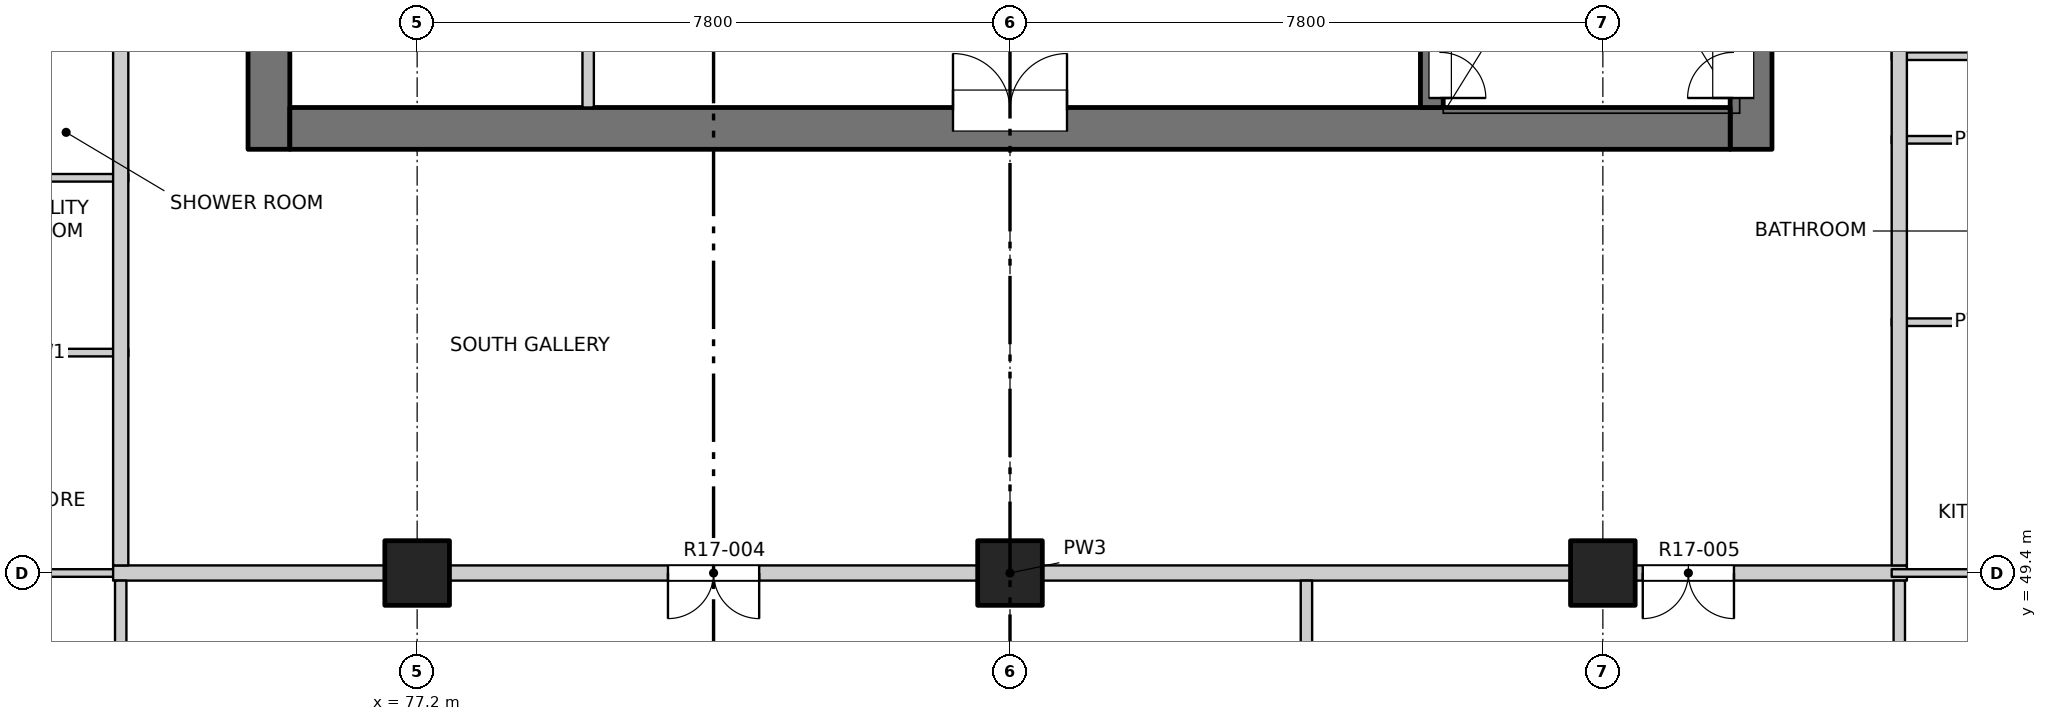
"""IFC4 building model, lengths in metres.
Left out: names, types, materials, properties, quantities, classifications, styles, units other than length and angle.
Written with IfcOpenShell. Run it as: python <this file> out.ifc"""

import sys

from ifc_helpers import new_model, si_unit, direction, frame, frame_2d, origin, origin_2d, place, context, subcontext, project, spatial, rectangle, extrude, element, fill, save


model = new_model("IFC4")
c1 = context("Model", 3, precision=1e-05, world=origin(), true_north=direction((0.0, 1.0)))
c2 = subcontext(c1, "Body", "Model", "MODEL_VIEW")
j1 = project(units=[si_unit("LENGTHUNIT", "METRE"), si_unit("PLANEANGLEUNIT", "RADIAN")], contexts=[c1])
p1 = place(None, origin())
s1 = spatial("IfcSite", under=j1, at=p1, CompositionType="ELEMENT")
p2 = place(p1, origin())
s2 = spatial("IfcBuilding", under=s1, at=p2, CompositionType="ELEMENT")
p3 = place(p2, frame((0.0, 0.0, 179.2)))
s3 = spatial("IfcBuildingStorey", under=s2, at=p3, CompositionType="ELEMENT", Elevation=179.2)
for number, where, z_axis, x_axis in (
    (1, (77.2, 49.4, -0.3), (0.0, 0.0, 1.0), (1.0, 0.0, 0.0)),
    (2, (85.0, 49.4, -0.3), (0.0, 0.0, 1.0), (1.0, 0.0, 0.0)),
    (3, (92.8, 49.4, -0.3), (0.0, 0.0, 1.0), (1.0, 0.0, 0.0)),
):
    element("IfcColumn", number, at=place(p3, frame(where, z_axis=z_axis, x_axis=x_axis)), inside=s3, PredefinedType="COLUMN", context=c2, shape_type="SweptSolid", body=[
        extrude(rectangle(XDim=0.85, YDim=0.85, at=origin_2d()), origin(), (0.0, 0.0, 1.0), 3.45),
    ])
p4 = place(p3, frame((75.25, 54.975, -0.3), z_axis=(0.0, 0.0, 1.0), x_axis=(0.0, 1.0, 0.0)))
e4 = element("IfcWall", 4, at=p4, inside=s3, PredefinedType="SOLIDWALL", context=c2, shape_type="SweptSolid", body=[
    extrude(rectangle(XDim=22.325, YDim=0.55, at=frame_2d((11.163, 0.0))), origin(), (0.0, 0.0, 1.0), 3.45),
])
p5 = place(p4, frame((7.475, 0.0, 0.3)))
e5 = element("IfcOpeningElement", 5, at=p5, cuts=e4, PredefinedType="OPENING", context=c2, shape_type="SweptSolid", body=[
    extrude(rectangle(XDim=0.9, YDim=2.1, at=frame_2d((0.45, 1.05))), frame((0.0, 0.285, 0.0), z_axis=(0.0, -1.0, 0.0), x_axis=(1.0, 0.0, 0.0)), (0.0, 0.0, 1.0), 0.57),
])
p6 = place(p4, frame((10.775, 0.0, 0.3)))
e6 = element("IfcOpeningElement", 6, at=p6, cuts=e4, PredefinedType="OPENING", context=c2, shape_type="SweptSolid", body=[
    extrude(rectangle(XDim=0.9, YDim=2.1, at=frame_2d((0.45, 1.05))), frame((0.0, 0.285, 0.0), z_axis=(0.0, -1.0, 0.0), x_axis=(1.0, 0.0, 0.0)), (0.0, 0.0, 1.0), 0.57),
])
p7 = place(p4, frame((15.275, 0.0, 0.3)))
e7 = element("IfcOpeningElement", 7, at=p7, cuts=e4, PredefinedType="OPENING", context=c2, shape_type="SweptSolid", body=[
    extrude(rectangle(XDim=0.9, YDim=2.1, at=frame_2d((0.45, 1.05))), frame((0.0, 0.285, 0.0), z_axis=(0.0, -1.0, 0.0), x_axis=(1.0, 0.0, 0.0)), (0.0, 0.0, 1.0), 0.57),
])
p8 = place(p4, frame((20.075, 0.0, 0.3)))
e8 = element("IfcOpeningElement", 8, at=p8, cuts=e4, PredefinedType="OPENING", context=c2, shape_type="SweptSolid", body=[
    extrude(rectangle(XDim=0.9, YDim=2.1, at=frame_2d((0.45, 1.05))), frame((0.0, 0.285, 0.0), z_axis=(0.0, -1.0, 0.0), x_axis=(1.0, 0.0, 0.0)), (0.0, 0.0, 1.0), 0.57),
])
p9 = place(p3, frame((94.75, 54.975, -0.3), z_axis=(0.0, 0.0, 1.0), x_axis=(0.0, 1.0, 0.0)))
e9 = element("IfcWall", 9, at=p9, inside=s3, PredefinedType="SOLIDWALL", context=c2, shape_type="SweptSolid", body=[
    extrude(rectangle(XDim=6.975, YDim=0.55, at=frame_2d((3.487, 0.0))), origin(), (0.0, 0.0, 1.0), 3.45),
])
p10 = place(p9, frame((0.675, 0.0, 0.3)))
e10 = element("IfcOpeningElement", 10, at=p10, cuts=e9, PredefinedType="OPENING", context=c2, shape_type="SweptSolid", body=[
    extrude(rectangle(XDim=1.2, YDim=2.1, at=frame_2d((0.6, 1.05))), frame((0.0, 0.285, 0.0), z_axis=(0.0, -1.0, 0.0), x_axis=(1.0, 0.0, 0.0)), (0.0, 0.0, 1.0), 0.57),
])
p11 = place(p3, frame((75.525, 55.25, -0.3), z_axis=(0.0, 0.0, 1.0), x_axis=(1.0, 0.0, 0.0)))
e11 = element("IfcWall", 11, at=p11, inside=s3, PredefinedType="SOLIDWALL", context=c2, shape_type="SweptSolid", body=[
    extrude(rectangle(XDim=18.95, YDim=0.55, at=frame_2d((9.475, 0.0))), origin(), (0.0, 0.0, 1.0), 3.45),
])
p12 = place(p11, frame((8.725, 0.0, 0.3)))
e12 = element("IfcOpeningElement", 12, at=p12, cuts=e11, PredefinedType="OPENING", context=c2, shape_type="SweptSolid", body=[
    extrude(rectangle(XDim=1.5, YDim=2.1, at=frame_2d((0.75, 1.05))), frame((0.0, 0.285, 0.0), z_axis=(0.0, -1.0, 0.0), x_axis=(1.0, 0.0, 0.0)), (0.0, 0.0, 1.0), 0.57),
])
p13 = place(p3, frame((90.55, 55.525, -0.3), z_axis=(0.0, 0.0, 1.0), x_axis=(0.0, 1.0, 0.0)))
e13 = element("IfcWall", 13, at=p13, inside=s3, PredefinedType="SOLIDWALL", context=c2, shape_type="SweptSolid", body=[
    extrude(rectangle(XDim=6.425, YDim=0.3, at=frame_2d((3.212, 0.0))), origin(), (0.0, 0.0, 1.0), 3.45),
])
p14 = place(p13, frame((0.125, 0.0, 0.3)))
e14 = element("IfcOpeningElement", 14, at=p14, cuts=e13, PredefinedType="OPENING", context=c2, shape_type="SweptSolid", body=[
    extrude(rectangle(XDim=1.2, YDim=2.1, at=frame_2d((0.6, 1.05))), frame((0.0, 0.16, 0.0), z_axis=(0.0, -1.0, 0.0), x_axis=(1.0, 0.0, 0.0)), (0.0, 0.0, 1.0), 0.32),
])
p15 = place(p3, frame((65.8, 49.4, 0.0), z_axis=(0.0, 0.0, 1.0), x_axis=(1.0, 0.0, 0.0)))
e15 = element("IfcWall", 15, at=p15, inside=s3, PredefinedType="PARTITIONING", context=c2, shape_type="SweptSolid", body=[
    extrude(rectangle(XDim=7.6, YDim=0.1, at=frame_2d((3.8, 0.0))), origin(), (0.0, 0.0, 1.0), 3.15),
])
p16 = place(p15, frame((4.14, 0.0, 0.0)))
e16 = element("IfcOpeningElement", 16, at=p16, cuts=e15, PredefinedType="OPENING", context=c2, shape_type="SweptSolid", body=[
    extrude(rectangle(XDim=0.9, YDim=2.1, at=frame_2d((0.45, 1.05))), frame((0.0, 0.06, 0.0), z_axis=(0.0, -1.0, 0.0), x_axis=(1.0, 0.0, 0.0)), (0.0, 0.0, 1.0), 0.12),
])
p17 = place(p3, frame((73.2, 49.4, 0.0), z_axis=(0.0, 0.0, 1.0), x_axis=(1.0, 0.0, 0.0)))
e17 = element("IfcWall", 17, at=p17, inside=s3, PredefinedType="PARTITIONING", context=c2, shape_type="SweptSolid", body=[
    extrude(rectangle(XDim=23.6, YDim=0.2, at=frame_2d((11.8, 0.0))), origin(), (0.0, 0.0, 1.0), 3.15),
])
p18 = place(p17, frame((7.3, 0.0, 0.0)))
e18 = element("IfcOpeningElement", 18, at=p18, cuts=e17, PredefinedType="OPENING", context=c2, shape_type="SweptSolid", body=[
    extrude(rectangle(XDim=1.2, YDim=2.1, at=frame_2d((0.6, 1.05))), frame((0.0, 0.11, 0.0), z_axis=(0.0, -1.0, 0.0), x_axis=(1.0, 0.0, 0.0)), (0.0, 0.0, 1.0), 0.22),
])
p19 = place(p17, frame((20.125, 0.0, 0.0)))
e19 = element("IfcOpeningElement", 19, at=p19, cuts=e17, PredefinedType="OPENING", context=c2, shape_type="SweptSolid", body=[
    extrude(rectangle(XDim=1.2, YDim=2.1, at=frame_2d((0.6, 1.05))), frame((0.0, 0.11, 0.0), z_axis=(0.0, -1.0, 0.0), x_axis=(1.0, 0.0, 0.0)), (0.0, 0.0, 1.0), 0.22),
])
p20 = place(p3, frame((96.6, 49.4, 0.0), z_axis=(0.0, 0.0, 1.0), x_axis=(1.0, 0.0, 0.0)))
e20 = element("IfcWall", 20, at=p20, inside=s3, PredefinedType="PARTITIONING", context=c2, shape_type="SweptSolid", body=[
    extrude(rectangle(XDim=7.6, YDim=0.1, at=frame_2d((3.8, 0.0))), origin(), (0.0, 0.0, 1.0), 3.15),
])
p21 = place(p20, frame((2.56, 0.0, 0.0)))
e21 = element("IfcOpeningElement", 21, at=p21, cuts=e20, PredefinedType="OPENING", context=c2, shape_type="SweptSolid", body=[
    extrude(rectangle(XDim=0.9, YDim=2.1, at=frame_2d((0.45, 1.05))), frame((0.0, 0.06, 0.0), z_axis=(0.0, -1.0, 0.0), x_axis=(1.0, 0.0, 0.0)), (0.0, 0.0, 1.0), 0.12),
])
for number, where, z_axis, x_axis in (
    (22, (71.18, 52.3, 0.0), (0.0, 0.0, 1.0), (1.0, 0.0, 0.0)),
    (23, (96.6, 52.7, 0.0), (0.0, 0.0, 1.0), (1.0, 0.0, 0.0)),
    (24, (71.18, 54.6, 0.0), (0.0, 0.0, 1.0), (1.0, 0.0, 0.0)),
    (25, (96.6, 55.1, 0.0), (0.0, 0.0, 1.0), (1.0, 0.0, 0.0)),
    (26, (96.6, 56.2, 0.0), (0.0, 0.0, 1.0), (1.0, 0.0, 0.0)),
):
    element("IfcWall", number, at=place(p3, frame(where, z_axis=z_axis, x_axis=x_axis)), inside=s3, PredefinedType="PARTITIONING", context=c2, shape_type="SweptSolid", body=[
        extrude(rectangle(XDim=2.22, YDim=0.1, at=frame_2d((1.11, 0.0))), origin(), (0.0, 0.0, 1.0), 3.15),
    ])
p22 = place(p3, frame((73.3, 45.8, 0.0), z_axis=(0.0, 0.0, 1.0), x_axis=(0.0, 1.0, 0.0)))
e27 = element("IfcWall", 27, at=p22, inside=s3, PredefinedType="PARTITIONING", context=c2, shape_type="SweptSolid", body=[
    extrude(rectangle(XDim=3.5, YDim=0.15, at=frame_2d((1.75, 0.0))), origin(), (0.0, 0.0, 1.0), 3.15),
])
p23 = place(p3, frame((73.3, 49.5, 0.0), z_axis=(0.0, 0.0, 1.0), x_axis=(0.0, 1.0, 0.0)))
e28 = element("IfcWall", 28, at=p23, inside=s3, PredefinedType="PARTITIONING", context=c2, shape_type="SweptSolid", body=[
    extrude(rectangle(XDim=34.7, YDim=0.2, at=frame_2d((17.35, 0.0))), origin(), (0.0, 0.0, 1.0), 3.15),
])
p24 = place(p23, frame((10.575, 0.0, 0.0)))
e29 = element("IfcOpeningElement", 29, at=p24, cuts=e28, PredefinedType="OPENING", context=c2, shape_type="SweptSolid", body=[
    extrude(rectangle(XDim=1.0, YDim=2.1, at=frame_2d((0.5, 1.05))), frame((0.0, 0.11, 0.0), z_axis=(0.0, -1.0, 0.0), x_axis=(1.0, 0.0, 0.0)), (0.0, 0.0, 1.0), 0.22),
])
p25 = place(p23, frame((18.825, 0.0, 0.0)))
e30 = element("IfcOpeningElement", 30, at=p25, cuts=e28, PredefinedType="OPENING", context=c2, shape_type="SweptSolid", body=[
    extrude(rectangle(XDim=1.0, YDim=2.1, at=frame_2d((0.5, 1.05))), frame((0.0, 0.11, 0.0), z_axis=(0.0, -1.0, 0.0), x_axis=(1.0, 0.0, 0.0)), (0.0, 0.0, 1.0), 0.22),
])
p26 = place(p23, frame((29.075, 0.0, 0.0)))
e31 = element("IfcOpeningElement", 31, at=p26, cuts=e28, PredefinedType="OPENING", context=c2, shape_type="SweptSolid", body=[
    extrude(rectangle(XDim=1.0, YDim=2.1, at=frame_2d((0.5, 1.05))), frame((0.0, 0.11, 0.0), z_axis=(0.0, -1.0, 0.0), x_axis=(1.0, 0.0, 0.0)), (0.0, 0.0, 1.0), 0.22),
])
p27 = place(p3, frame((79.45, 55.525, 0.0), z_axis=(0.0, 0.0, 1.0), x_axis=(0.0, 1.0, 0.0)))
e32 = element("IfcWall", 32, at=p27, inside=s3, PredefinedType="PARTITIONING", context=c2, shape_type="SweptSolid", body=[
    extrude(rectangle(XDim=5.375, YDim=0.15, at=frame_2d((2.688, 0.0))), origin(), (0.0, 0.0, 1.0), 3.15),
])
p28 = place(p27, frame((2.175, 0.0, 0.0)))
e33 = element("IfcOpeningElement", 33, at=p28, cuts=e32, PredefinedType="OPENING", context=c2, shape_type="SweptSolid", body=[
    extrude(rectangle(XDim=0.9, YDim=2.1, at=frame_2d((0.45, 1.05))), frame((0.0, 0.085, 0.0), z_axis=(0.0, -1.0, 0.0), x_axis=(1.0, 0.0, 0.0)), (0.0, 0.0, 1.0), 0.17),
])
p29 = place(p3, frame((88.9, 45.8, 0.0), z_axis=(0.0, 0.0, 1.0), x_axis=(0.0, 1.0, 0.0)))
e34 = element("IfcWall", 34, at=p29, inside=s3, PredefinedType="PARTITIONING", context=c2, shape_type="SweptSolid", body=[
    extrude(rectangle(XDim=3.5, YDim=0.15, at=frame_2d((1.75, 0.0))), origin(), (0.0, 0.0, 1.0), 2.55),
])
p30 = place(p3, frame((96.7, 45.8, 0.0), z_axis=(0.0, 0.0, 1.0), x_axis=(0.0, 1.0, 0.0)))
e35 = element("IfcWall", 35, at=p30, inside=s3, PredefinedType="PARTITIONING", context=c2, shape_type="SweptSolid", body=[
    extrude(rectangle(XDim=3.5, YDim=0.15, at=frame_2d((1.75, 0.0))), origin(), (0.0, 0.0, 1.0), 3.15),
])
p31 = place(p3, frame((96.7, 49.5, 0.0), z_axis=(0.0, 0.0, 1.0), x_axis=(0.0, 1.0, 0.0)))
e36 = element("IfcWall", 36, at=p31, inside=s3, PredefinedType="PARTITIONING", context=c2, shape_type="SweptSolid", body=[
    extrude(rectangle(XDim=34.7, YDim=0.2, at=frame_2d((17.35, 0.0))), origin(), (0.0, 0.0, 1.0), 3.15),
])
p32 = place(p31, frame((6.875, 0.0, 0.0)))
e37 = element("IfcOpeningElement", 37, at=p32, cuts=e36, PredefinedType="OPENING", context=c2, shape_type="SweptSolid", body=[
    extrude(rectangle(XDim=1.0, YDim=2.1, at=frame_2d((0.5, 1.05))), frame((0.0, 0.11, 0.0), z_axis=(0.0, -1.0, 0.0), x_axis=(1.0, 0.0, 0.0)), (0.0, 0.0, 1.0), 0.22),
])
p33 = place(p31, frame((21.775, 0.0, 0.0)))
e38 = element("IfcOpeningElement", 38, at=p33, cuts=e36, PredefinedType="OPENING", context=c2, shape_type="SweptSolid", body=[
    extrude(rectangle(XDim=1.0, YDim=2.1, at=frame_2d((0.5, 1.05))), frame((0.0, 0.11, 0.0), z_axis=(0.0, -1.0, 0.0), x_axis=(1.0, 0.0, 0.0)), (0.0, 0.0, 1.0), 0.22),
])
p34 = place(p31, frame((27.725, 0.0, 0.0)))
e39 = element("IfcOpeningElement", 39, at=p34, cuts=e36, PredefinedType="OPENING", context=c2, shape_type="SweptSolid", body=[
    extrude(rectangle(XDim=1.0, YDim=2.1, at=frame_2d((0.5, 1.05))), frame((0.0, 0.11, 0.0), z_axis=(0.0, -1.0, 0.0), x_axis=(1.0, 0.0, 0.0)), (0.0, 0.0, 1.0), 0.22),
])
p35 = place(p18, origin())
e40 = element("IfcDoor", 40, at=p35, inside=s3, OperationType="DOUBLE_DOOR_SINGLE_SWING", PredefinedType="DOOR", context=c2, shape_type="SweptSolid", body=[
    extrude(rectangle(XDim=1.2, YDim=2.1, at=frame_2d((0.6, 1.05))), frame((0.0, 0.025, 0.0), z_axis=(0.0, -1.0, 0.0), x_axis=(1.0, 0.0, 0.0)), (0.0, 0.0, 1.0), 0.05),
])
fill(e18, e40)
p36 = place(p19, origin())
e41 = element("IfcDoor", 41, at=p36, inside=s3, OperationType="DOUBLE_DOOR_SINGLE_SWING", PredefinedType="DOOR", context=c2, shape_type="SweptSolid", body=[
    extrude(rectangle(XDim=1.2, YDim=2.1, at=frame_2d((0.6, 1.05))), frame((0.0, 0.025, 0.0), z_axis=(0.0, -1.0, 0.0), x_axis=(1.0, 0.0, 0.0)), (0.0, 0.0, 1.0), 0.05),
])
fill(e19, e41)
p37 = place(p12, origin())
e42 = element("IfcDoor", 42, at=p37, inside=s3, OperationType="DOUBLE_DOOR_SINGLE_SWING", PredefinedType="DOOR", context=c2, shape_type="SweptSolid", body=[
    extrude(rectangle(XDim=1.5, YDim=2.1, at=frame_2d((0.75, 1.05))), frame((0.0, 0.26, 0.0), z_axis=(0.0, -1.0, 0.0), x_axis=(1.0, 0.0, 0.0)), (0.0, 0.0, 1.0), 0.05),
])
fill(e12, e42)
p38 = place(p14, origin())
e43 = element("IfcDoor", 43, at=p38, inside=s3, OperationType="DOUBLE_DOOR_SINGLE_SWING", PredefinedType="DOOR", context=c2, shape_type="SweptSolid", body=[
    extrude(rectangle(XDim=1.2, YDim=2.1, at=frame_2d((0.6, 1.05))), frame((0.0, -0.085, 0.0), z_axis=(0.0, -1.0, 0.0), x_axis=(1.0, 0.0, 0.0)), (0.0, 0.0, 1.0), 0.05),
])
fill(e14, e43)
p39 = place(p10, origin())
e44 = element("IfcDoor", 44, at=p39, inside=s3, OperationType="DOUBLE_DOOR_SINGLE_SWING", PredefinedType="DOOR", context=c2, shape_type="SweptSolid", body=[
    extrude(rectangle(XDim=1.2, YDim=2.1, at=frame_2d((0.6, 1.05))), frame((0.0, 0.26, 0.0), z_axis=(0.0, -1.0, 0.0), x_axis=(1.0, 0.0, 0.0)), (0.0, 0.0, 1.0), 0.05),
])
fill(e10, e44)
save(model, sys.argv[1])
